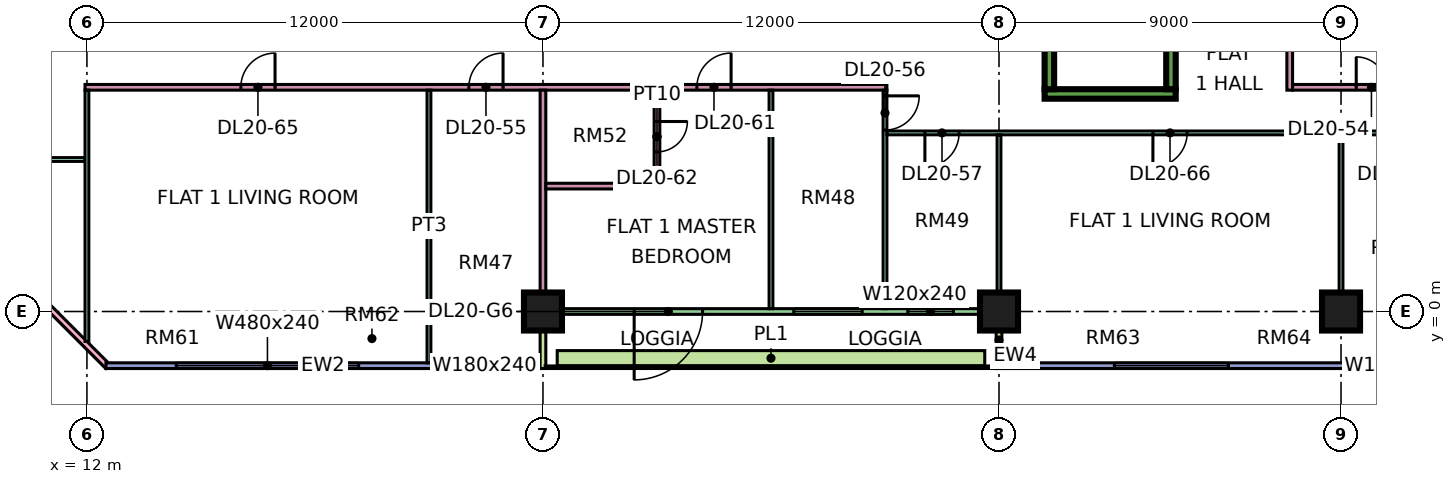
"""IFC4 building model, lengths in metres.
Left out: names, types, materials, properties, quantities, classifications, styles, units other than length and angle.
Written with IfcOpenShell. Run it as: python <this file> out.ifc"""

import sys

from ifc_helpers import new_model, si_unit, direction, frame, frame_2d, origin, origin_2d, place, context, subcontext, project, spatial, rectangle, extrude, element, fill, save


model = new_model("IFC4")
c1 = context("Model", 3, precision=1e-05, world=origin(), true_north=direction((0.0, 1.0)))
c2 = subcontext(c1, "Body", "Model", "MODEL_VIEW")
j1 = project(units=[si_unit("LENGTHUNIT", "METRE"), si_unit("PLANEANGLEUNIT", "RADIAN")], contexts=[c1])
p1 = place(None, origin())
s1 = spatial("IfcSite", under=j1, at=p1, CompositionType="ELEMENT")
p2 = place(p1, origin())
s2 = spatial("IfcBuilding", under=s1, at=p2, CompositionType="ELEMENT")
p3 = place(p2, frame((0.0, 0.0, 91.9)))
s3 = spatial("IfcBuildingStorey", under=s2, at=p3, CompositionType="ELEMENT", Elevation=91.9)
for number, where, z_axis, x_axis in (
    (1, (24.0, 0.0, 0.0), (0.0, 0.0, 1.0), (1.0, 0.0, 0.0)),
    (2, (36.0, 0.0, 0.0), (0.0, 0.0, 1.0), (1.0, 0.0, 0.0)),
    (3, (45.0, 0.0, 0.0), (0.0, 0.0, 1.0), (1.0, 0.0, 0.0)),
):
    element("IfcColumn", number, at=place(p3, frame(where, z_axis=z_axis, x_axis=x_axis)), inside=s3, PredefinedType="COLUMN", context=c2, shape_type="SweptSolid", body=[
        extrude(rectangle(XDim=1.0, YDim=1.0, at=origin_2d()), origin(), (0.0, 0.0, 1.0), 3.75),
    ])
p4 = place(p3, frame((37.2, 5.725, 0.0), z_axis=(0.0, 0.0, 1.0), x_axis=(1.0, 0.0, 0.0)))
e4 = element("IfcWall", 4, at=p4, inside=s3, PredefinedType="SHEAR", context=c2, shape_type="SweptSolid", body=[
    extrude(rectangle(XDim=3.45, YDim=0.25, at=frame_2d((1.725, 0.0))), origin(), (0.0, 0.0, 1.0), 3.75),
])
for number, where, z_axis, x_axis in (
    (5, (37.325, 5.85, 0.0), (0.0, 0.0, 1.0), (0.0, 1.0, 0.0)),
    (6, (40.525, 5.85, 0.0), (0.0, 0.0, 1.0), (0.0, 1.0, 0.0)),
):
    element("IfcWall", number, at=place(p3, frame(where, z_axis=z_axis, x_axis=x_axis)), inside=s3, PredefinedType="SHEAR", context=c2, shape_type="SweptSolid", body=[
        extrude(rectangle(XDim=6.5, YDim=0.25, at=frame_2d((3.25, 0.0))), origin(), (0.0, 0.0, 1.0), 3.75),
    ])
p5 = place(p3, frame((-1.447, 12.553, 0.0), z_axis=(0.0, 0.0, 1.0), x_axis=(0.707106781187, -0.707106781187, 0.0)))
e7 = element("IfcWall", 7, at=p5, inside=s3, PredefinedType="SOLIDWALL", context=c2, shape_type="SweptSolid", body=[
    extrude(rectangle(XDim=19.799, YDim=0.15, at=frame_2d((9.899, 0.0))), origin(), (0.0, 0.0, 1.0), 3.35),
])
p6 = place(p5, frame((2.212, 0.0, 0.45)))
e8 = element("IfcOpeningElement", 8, at=p6, cuts=e7, PredefinedType="OPENING", context=c2, shape_type="SweptSolid", body=[
    extrude(rectangle(XDim=3.0, YDim=2.4, at=frame_2d((1.5, 1.2))), frame((0.0, 0.085, 0.0), z_axis=(0.0, -1.0, 0.0), x_axis=(1.0, 0.0, 0.0)), (0.0, 0.0, 1.0), 0.17),
])
p7 = place(p5, frame((10.216, 0.0, 0.45)))
e9 = element("IfcOpeningElement", 9, at=p7, cuts=e7, PredefinedType="OPENING", context=c2, shape_type="SweptSolid", body=[
    extrude(rectangle(XDim=3.0, YDim=2.4, at=frame_2d((1.5, 1.2))), frame((0.0, 0.085, 0.0), z_axis=(0.0, -1.0, 0.0), x_axis=(1.0, 0.0, 0.0)), (0.0, 0.0, 1.0), 0.17),
])
p8 = place(p3, frame((12.5, -1.425, 0.0), z_axis=(0.0, 0.0, 1.0), x_axis=(1.0, 0.0, 0.0)))
e10 = element("IfcWall", 10, at=p8, inside=s3, PredefinedType="SOLIDWALL", context=c2, shape_type="SweptSolid", body=[
    extrude(rectangle(XDim=11.425, YDim=0.15, at=frame_2d((5.712, 0.0))), origin(), (0.0, 0.0, 1.0), 3.35),
])
p9 = place(p8, frame((1.85, 0.0, 0.45)))
e11 = element("IfcOpeningElement", 11, at=p9, cuts=e10, PredefinedType="OPENING", context=c2, shape_type="SweptSolid", body=[
    extrude(rectangle(XDim=4.8, YDim=2.4, at=frame_2d((2.4, 1.2))), frame((0.0, 0.085, 0.0), z_axis=(0.0, -1.0, 0.0), x_axis=(1.0, 0.0, 0.0)), (0.0, 0.0, 1.0), 0.17),
])
p10 = place(p8, frame((9.062, 0.0, 0.45)))
e12 = element("IfcOpeningElement", 12, at=p10, cuts=e10, PredefinedType="OPENING", context=c2, shape_type="SweptSolid", body=[
    extrude(rectangle(XDim=1.8, YDim=2.4, at=frame_2d((0.9, 1.2))), frame((0.0, 0.085, 0.0), z_axis=(0.0, -1.0, 0.0), x_axis=(1.0, 0.0, 0.0)), (0.0, 0.0, 1.0), 0.17),
])
p11 = place(p3, frame((24.075, 0.0, 0.0), z_axis=(0.0, 0.0, 1.0), x_axis=(1.0, 0.0, 0.0)))
e13 = element("IfcWall", 13, at=p11, inside=s3, PredefinedType="SOLIDWALL", context=c2, shape_type="SweptSolid", body=[
    extrude(rectangle(XDim=11.85, YDim=0.15, at=frame_2d((5.925, 0.0))), origin(), (0.0, 0.0, 1.0), 3.35),
])
p12 = place(p11, frame((2.325, 0.0, 0.0)))
e14 = element("IfcOpeningElement", 14, at=p12, cuts=e13, PredefinedType="OPENING", context=c2, shape_type="SweptSolid", body=[
    extrude(rectangle(XDim=1.8, YDim=2.4, at=frame_2d((0.9, 1.2))), frame((0.0, 0.085, 0.0), z_axis=(0.0, -1.0, 0.0), x_axis=(1.0, 0.0, 0.0)), (0.0, 0.0, 1.0), 0.17),
])
p13 = place(p11, frame((6.525, 0.0, 0.45)))
e15 = element("IfcOpeningElement", 15, at=p13, cuts=e13, PredefinedType="OPENING", context=c2, shape_type="SweptSolid", body=[
    extrude(rectangle(XDim=1.8, YDim=2.4, at=frame_2d((0.9, 1.2))), frame((0.0, 0.085, 0.0), z_axis=(0.0, -1.0, 0.0), x_axis=(1.0, 0.0, 0.0)), (0.0, 0.0, 1.0), 0.17),
])
p14 = place(p11, frame((9.525, 0.0, 0.45)))
e16 = element("IfcOpeningElement", 16, at=p14, cuts=e13, PredefinedType="OPENING", context=c2, shape_type="SweptSolid", body=[
    extrude(rectangle(XDim=1.2, YDim=2.4, at=frame_2d((0.6, 1.2))), frame((0.0, 0.085, 0.0), z_axis=(0.0, -1.0, 0.0), x_axis=(1.0, 0.0, 0.0)), (0.0, 0.0, 1.0), 0.17),
])
for number, where, z_axis, x_axis in (
    (17, (24.0, -1.5, 0.0), (0.0, 0.0, 1.0), (0.0, 1.0, 0.0)),
    (18, (36.0, -1.5, 0.0), (0.0, 0.0, 1.0), (0.0, 1.0, 0.0)),
):
    element("IfcWall", number, at=place(p3, frame(where, z_axis=z_axis, x_axis=x_axis)), inside=s3, PredefinedType="SOLIDWALL", context=c2, shape_type="SweptSolid", body=[
        extrude(rectangle(XDim=1.5, YDim=0.15, at=frame_2d((0.75, 0.0))), origin(), (0.0, 0.0, 1.0), 3.35),
    ])
p15 = place(p3, frame((36.075, -1.425, 0.0), z_axis=(0.0, 0.0, 1.0), x_axis=(1.0, 0.0, 0.0)))
e19 = element("IfcWall", 19, at=p15, inside=s3, PredefinedType="SOLIDWALL", context=c2, shape_type="SweptSolid", body=[
    extrude(rectangle(XDim=11.85, YDim=0.15, at=frame_2d((5.925, 0.0))), origin(), (0.0, 0.0, 1.0), 3.35),
])
p16 = place(p15, frame((2.962, 0.0, 0.45)))
e20 = element("IfcOpeningElement", 20, at=p16, cuts=e19, PredefinedType="OPENING", context=c2, shape_type="SweptSolid", body=[
    extrude(rectangle(XDim=3.0, YDim=2.4, at=frame_2d((1.5, 1.2))), frame((0.0, 0.085, 0.0), z_axis=(0.0, -1.0, 0.0), x_axis=(1.0, 0.0, 0.0)), (0.0, 0.0, 1.0), 0.17),
])
p17 = place(p15, frame((9.488, 0.0, 0.45)))
e21 = element("IfcOpeningElement", 21, at=p17, cuts=e19, PredefinedType="OPENING", context=c2, shape_type="SweptSolid", body=[
    extrude(rectangle(XDim=1.8, YDim=2.4, at=frame_2d((0.9, 1.2))), frame((0.0, 0.085, 0.0), z_axis=(0.0, -1.0, 0.0), x_axis=(1.0, 0.0, 0.0)), (0.0, 0.0, 1.0), 0.17),
])
p18 = place(p3, frame((24.375, -1.229, 0.0), z_axis=(0.0, 0.0, 1.0), x_axis=(1.0, 0.0, 0.0)))
e22 = element("IfcWall", 22, at=p18, inside=s3, PredefinedType="SOLIDWALL", context=c2, shape_type="SweptSolid", body=[
    extrude(rectangle(XDim=11.25, YDim=0.4, at=frame_2d((5.625, 0.0))), origin(), (0.0, 0.0, 1.0), 0.7),
])
p19 = place(p3, frame((9.05, 4.0, 0.0), z_axis=(0.0, 0.0, 1.0), x_axis=(1.0, 0.0, 0.0)))
e23 = element("IfcWall", 23, at=p19, inside=s3, PredefinedType="PARTITIONING", context=c2, shape_type="SweptSolid", body=[
    extrude(rectangle(XDim=2.9, YDim=0.1, at=frame_2d((1.45, 0.0))), origin(), (0.0, 0.0, 1.0), 3.35),
])
p20 = place(p3, frame((11.95, 5.9, 0.0), z_axis=(0.0, 0.0, 1.0), x_axis=(1.0, 0.0, 0.0)))
e24 = element("IfcWall", 24, at=p20, inside=s3, PredefinedType="PARTITIONING", context=c2, shape_type="SweptSolid", body=[
    extrude(rectangle(XDim=21.1, YDim=0.15, at=frame_2d((10.55, 0.0))), origin(), (0.0, 0.0, 1.0), 3.35),
])
p21 = place(p20, frame((10.1, 0.0, 0.0)))
e25 = element("IfcOpeningElement", 25, at=p21, cuts=e24, PredefinedType="OPENING", context=c2, shape_type="SweptSolid", body=[
    extrude(rectangle(XDim=0.9, YDim=2.1, at=frame_2d((0.45, 1.05))), frame((0.0, 0.085, 0.0), z_axis=(0.0, -1.0, 0.0), x_axis=(1.0, 0.0, 0.0)), (0.0, 0.0, 1.0), 0.17),
])
p22 = place(p20, frame((16.1, 0.0, 0.0)))
e26 = element("IfcOpeningElement", 26, at=p22, cuts=e24, PredefinedType="OPENING", context=c2, shape_type="SweptSolid", body=[
    extrude(rectangle(XDim=0.9, YDim=2.1, at=frame_2d((0.45, 1.05))), frame((0.0, 0.085, 0.0), z_axis=(0.0, -1.0, 0.0), x_axis=(1.0, 0.0, 0.0)), (0.0, 0.0, 1.0), 0.17),
])
p23 = place(p20, frame((4.1, 0.0, 0.0)))
e27 = element("IfcOpeningElement", 27, at=p23, cuts=e24, PredefinedType="OPENING", context=c2, shape_type="SweptSolid", body=[
    extrude(rectangle(XDim=0.9, YDim=2.1, at=frame_2d((0.45, 1.05))), frame((0.0, 0.085, 0.0), z_axis=(0.0, -1.0, 0.0), x_axis=(1.0, 0.0, 0.0)), (0.0, 0.0, 1.0), 0.17),
])
p24 = place(p3, frame((12.0, -0.788, 0.0), z_axis=(0.0, 0.0, 1.0), x_axis=(0.0, 1.0, 0.0)))
e28 = element("IfcWall", 28, at=p24, inside=s3, PredefinedType="PARTITIONING", context=c2, shape_type="SweptSolid", body=[
    extrude(rectangle(XDim=6.613, YDim=0.1, at=frame_2d((3.306, 0.0))), origin(), (0.0, 0.0, 1.0), 3.35),
])
p25 = place(p3, frame((21.0, -1.35, 0.0), z_axis=(0.0, 0.0, 1.0), x_axis=(0.0, 1.0, 0.0)))
e29 = element("IfcWall", 29, at=p25, inside=s3, PredefinedType="PARTITIONING", context=c2, shape_type="SweptSolid", body=[
    extrude(rectangle(XDim=7.175, YDim=0.1, at=frame_2d((3.587, 0.0))), origin(), (0.0, 0.0, 1.0), 3.35),
])
p26 = place(p3, frame((24.0, 0.0, 0.0), z_axis=(0.0, 0.0, 1.0), x_axis=(0.0, 1.0, 0.0)))
e30 = element("IfcWall", 30, at=p26, inside=s3, PredefinedType="PARTITIONING", context=c2, shape_type="SweptSolid", body=[
    extrude(rectangle(XDim=5.825, YDim=0.15, at=frame_2d((2.913, 0.0))), origin(), (0.0, 0.0, 1.0), 3.35),
])
p27 = place(p3, frame((24.075, 3.3, 0.0), z_axis=(0.0, 0.0, 1.0), x_axis=(1.0, 0.0, 0.0)))
e31 = element("IfcWall", 31, at=p27, inside=s3, PredefinedType="PARTITIONING", context=c2, shape_type="SweptSolid", body=[
    extrude(rectangle(XDim=3.0, YDim=0.15, at=frame_2d((1.5, 0.0))), origin(), (0.0, 0.0, 1.0), 3.35),
])
p28 = place(p3, frame((27.0, 3.375, 0.0), z_axis=(0.0, 0.0, 1.0), x_axis=(0.0, 1.0, 0.0)))
e32 = element("IfcWall", 32, at=p28, inside=s3, PredefinedType="PARTITIONING", context=c2, shape_type="SweptSolid", body=[
    extrude(rectangle(XDim=2.45, YDim=0.15, at=frame_2d((1.225, 0.0))), origin(), (0.0, 0.0, 1.0), 3.35),
])
p29 = place(p28, frame((0.825, 0.0, 0.0)))
e33 = element("IfcOpeningElement", 33, at=p29, cuts=e32, PredefinedType="OPENING", context=c2, shape_type="SweptSolid", body=[
    extrude(rectangle(XDim=0.8, YDim=2.1, at=frame_2d((0.4, 1.05))), frame((0.0, 0.085, 0.0), z_axis=(0.0, -1.0, 0.0), x_axis=(1.0, 0.0, 0.0)), (0.0, 0.0, 1.0), 0.17),
])
p30 = place(p3, frame((30.0, 0.074, 0.0), z_axis=(0.0, 0.0, 1.0), x_axis=(0.0, 1.0, 0.0)))
e34 = element("IfcWall", 34, at=p30, inside=s3, PredefinedType="PARTITIONING", context=c2, shape_type="SweptSolid", body=[
    extrude(rectangle(XDim=5.751, YDim=0.1, at=frame_2d((2.875, 0.0))), origin(), (0.0, 0.0, 1.0), 3.35),
])
p31 = place(p3, frame((33.0, 0.074, 0.0), z_axis=(0.0, 0.0, 1.0), x_axis=(0.0, 1.0, 0.0)))
e35 = element("IfcWall", 35, at=p31, inside=s3, PredefinedType="PARTITIONING", context=c2, shape_type="SweptSolid", body=[
    extrude(rectangle(XDim=5.751, YDim=0.1, at=frame_2d((2.875, 0.0))), origin(), (0.0, 0.0, 1.0), 3.35),
])
p32 = place(p31, frame((4.701, 0.0, 0.0)))
e36 = element("IfcOpeningElement", 36, at=p32, cuts=e35, PredefinedType="OPENING", context=c2, shape_type="SweptSolid", body=[
    extrude(rectangle(XDim=0.9, YDim=2.1, at=frame_2d((0.45, 1.05))), frame((0.0, 0.06, 0.0), z_axis=(0.0, -1.0, 0.0), x_axis=(1.0, 0.0, 0.0)), (0.0, 0.0, 1.0), 0.12),
])
p33 = place(p3, frame((33.05, 4.7, 0.0), z_axis=(0.0, 0.0, 1.0), x_axis=(1.0, 0.0, 0.0)))
e37 = element("IfcWall", 37, at=p33, inside=s3, PredefinedType="PARTITIONING", context=c2, shape_type="SweptSolid", body=[
    extrude(rectangle(XDim=14.85, YDim=0.1, at=frame_2d((7.425, 0.0))), origin(), (0.0, 0.0, 1.0), 3.35),
])
p34 = place(p33, frame((1.0, 0.0, 0.0)))
e38 = element("IfcOpeningElement", 38, at=p34, cuts=e37, PredefinedType="OPENING", context=c2, shape_type="SweptSolid", body=[
    extrude(rectangle(XDim=0.9, YDim=2.1, at=frame_2d((0.45, 1.05))), frame((0.0, 0.06, 0.0), z_axis=(0.0, -1.0, 0.0), x_axis=(1.0, 0.0, 0.0)), (0.0, 0.0, 1.0), 0.12),
])
p35 = place(p33, frame((13.0, 0.0, 0.0)))
e39 = element("IfcOpeningElement", 39, at=p35, cuts=e37, PredefinedType="OPENING", context=c2, shape_type="SweptSolid", body=[
    extrude(rectangle(XDim=0.9, YDim=2.1, at=frame_2d((0.45, 1.05))), frame((0.0, 0.06, 0.0), z_axis=(0.0, -1.0, 0.0), x_axis=(1.0, 0.0, 0.0)), (0.0, 0.0, 1.0), 0.12),
])
p36 = place(p33, frame((7.0, 0.0, 0.0)))
e40 = element("IfcOpeningElement", 40, at=p36, cuts=e37, PredefinedType="OPENING", context=c2, shape_type="SweptSolid", body=[
    extrude(rectangle(XDim=0.9, YDim=2.1, at=frame_2d((0.45, 1.05))), frame((0.0, 0.06, 0.0), z_axis=(0.0, -1.0, 0.0), x_axis=(1.0, 0.0, 0.0)), (0.0, 0.0, 1.0), 0.12),
])
p37 = place(p3, frame((36.0, 0.0, 0.0), z_axis=(0.0, 0.0, 1.0), x_axis=(0.0, 1.0, 0.0)))
e41 = element("IfcWall", 41, at=p37, inside=s3, PredefinedType="PARTITIONING", context=c2, shape_type="SweptSolid", body=[
    extrude(rectangle(XDim=4.65, YDim=0.1, at=frame_2d((2.325, 0.0))), origin(), (0.0, 0.0, 1.0), 3.35),
])
p38 = place(p3, frame((43.65, 5.825, 0.0), z_axis=(0.0, 0.0, 1.0), x_axis=(0.0, 1.0, 0.0)))
e42 = element("IfcWall", 42, at=p38, inside=s3, PredefinedType="PARTITIONING", context=c2, shape_type="SweptSolid", body=[
    extrude(rectangle(XDim=6.575, YDim=0.15, at=frame_2d((3.288, 0.0))), origin(), (0.0, 0.0, 1.0), 3.35),
])
p39 = place(p38, frame((4.425, 0.0, 0.0)))
e43 = element("IfcOpeningElement", 43, at=p39, cuts=e42, PredefinedType="OPENING", context=c2, shape_type="SweptSolid", body=[
    extrude(rectangle(XDim=0.9, YDim=2.1, at=frame_2d((0.45, 1.05))), frame((0.0, 0.085, 0.0), z_axis=(0.0, -1.0, 0.0), x_axis=(1.0, 0.0, 0.0)), (0.0, 0.0, 1.0), 0.17),
])
p40 = place(p3, frame((43.725, 5.9, 0.0), z_axis=(0.0, 0.0, 1.0), x_axis=(1.0, 0.0, 0.0)))
e44 = element("IfcWall", 44, at=p40, inside=s3, PredefinedType="PARTITIONING", context=c2, shape_type="SweptSolid", body=[
    extrude(rectangle(XDim=4.175, YDim=0.15, at=frame_2d((2.087, 0.0))), origin(), (0.0, 0.0, 1.0), 3.35),
])
p41 = place(p40, frame((1.675, 0.0, 0.0)))
e45 = element("IfcOpeningElement", 45, at=p41, cuts=e44, PredefinedType="OPENING", context=c2, shape_type="SweptSolid", body=[
    extrude(rectangle(XDim=0.8, YDim=2.1, at=frame_2d((0.4, 1.05))), frame((0.0, 0.085, 0.0), z_axis=(0.0, -1.0, 0.0), x_axis=(1.0, 0.0, 0.0)), (0.0, 0.0, 1.0), 0.17),
])
p42 = place(p3, frame((45.0, 0.0, 0.0), z_axis=(0.0, 0.0, 1.0), x_axis=(0.0, 1.0, 0.0)))
e46 = element("IfcWall", 46, at=p42, inside=s3, PredefinedType="PARTITIONING", context=c2, shape_type="SweptSolid", body=[
    extrude(rectangle(XDim=4.65, YDim=0.1, at=frame_2d((2.325, 0.0))), origin(), (0.0, 0.0, 1.0), 3.35),
])
p43 = place(p9, origin())
e47 = element("IfcWindow", 47, at=p43, inside=s3, PartitioningType="SINGLE_PANEL", PredefinedType="WINDOW", context=c2, shape_type="SweptSolid", body=[
    extrude(rectangle(XDim=4.8, YDim=2.4, at=frame_2d((2.4, 1.2))), frame((0.0, 0.03, 0.0), z_axis=(0.0, -1.0, 0.0), x_axis=(1.0, 0.0, 0.0)), (0.0, 0.0, 1.0), 0.06),
])
fill(e11, e47)
p44 = place(p10, origin())
e48 = element("IfcWindow", 48, at=p44, inside=s3, PartitioningType="SINGLE_PANEL", PredefinedType="WINDOW", context=c2, shape_type="SweptSolid", body=[
    extrude(rectangle(XDim=1.8, YDim=2.4, at=frame_2d((0.9, 1.2))), frame((0.0, 0.03, 0.0), z_axis=(0.0, -1.0, 0.0), x_axis=(1.0, 0.0, 0.0)), (0.0, 0.0, 1.0), 0.06),
])
fill(e12, e48)
p45 = place(p12, frame((1.8, 0.0, 0.0), z_axis=(0.0, 0.0, 1.0), x_axis=(-1.0, 0.0, 0.0)))
e49 = element("IfcDoor", 49, at=p45, inside=s3, OperationType="DOUBLE_DOOR_SINGLE_SWING", PredefinedType="DOOR", context=c2, shape_type="SweptSolid", body=[
    extrude(rectangle(XDim=1.8, YDim=2.4, at=frame_2d((0.9, 1.2))), frame((0.0, 0.025, 0.0), z_axis=(0.0, -1.0, 0.0), x_axis=(1.0, 0.0, 0.0)), (0.0, 0.0, 1.0), 0.05),
])
fill(e14, e49)
p46 = place(p13, origin())
e50 = element("IfcWindow", 50, at=p46, inside=s3, PartitioningType="SINGLE_PANEL", PredefinedType="WINDOW", context=c2, shape_type="SweptSolid", body=[
    extrude(rectangle(XDim=1.8, YDim=2.4, at=frame_2d((0.9, 1.2))), frame((0.0, 0.03, 0.0), z_axis=(0.0, -1.0, 0.0), x_axis=(1.0, 0.0, 0.0)), (0.0, 0.0, 1.0), 0.06),
])
fill(e15, e50)
p47 = place(p14, origin())
e51 = element("IfcWindow", 51, at=p47, inside=s3, PartitioningType="SINGLE_PANEL", PredefinedType="WINDOW", context=c2, shape_type="SweptSolid", body=[
    extrude(rectangle(XDim=1.2, YDim=2.4, at=frame_2d((0.6, 1.2))), frame((0.0, 0.03, 0.0), z_axis=(0.0, -1.0, 0.0), x_axis=(1.0, 0.0, 0.0)), (0.0, 0.0, 1.0), 0.06),
])
fill(e16, e51)
p48 = place(p16, origin())
e52 = element("IfcWindow", 52, at=p48, inside=s3, PartitioningType="SINGLE_PANEL", PredefinedType="WINDOW", context=c2, shape_type="SweptSolid", body=[
    extrude(rectangle(XDim=3.0, YDim=2.4, at=frame_2d((1.5, 1.2))), frame((0.0, 0.03, 0.0), z_axis=(0.0, -1.0, 0.0), x_axis=(1.0, 0.0, 0.0)), (0.0, 0.0, 1.0), 0.06),
])
fill(e20, e52)
p49 = place(p17, origin())
e53 = element("IfcWindow", 53, at=p49, inside=s3, PartitioningType="SINGLE_PANEL", PredefinedType="WINDOW", context=c2, shape_type="SweptSolid", body=[
    extrude(rectangle(XDim=1.8, YDim=2.4, at=frame_2d((0.9, 1.2))), frame((0.0, 0.03, 0.0), z_axis=(0.0, -1.0, 0.0), x_axis=(1.0, 0.0, 0.0)), (0.0, 0.0, 1.0), 0.06),
])
fill(e21, e53)
p50 = place(p41, origin())
e54 = element("IfcDoor", 54, at=p50, inside=s3, OperationType="SINGLE_SWING_LEFT", PredefinedType="DOOR", context=c2, shape_type="SweptSolid", body=[
    extrude(rectangle(XDim=0.8, YDim=2.1, at=frame_2d((0.4, 1.05))), frame((0.0, 0.025, 0.0), z_axis=(0.0, -1.0, 0.0), x_axis=(1.0, 0.0, 0.0)), (0.0, 0.0, 1.0), 0.05),
])
fill(e45, e54)
p51 = place(p21, frame((0.9, 0.0, 0.0), z_axis=(0.0, 0.0, 1.0), x_axis=(-1.0, 0.0, 0.0)))
e55 = element("IfcDoor", 55, at=p51, inside=s3, OperationType="SINGLE_SWING_RIGHT", PredefinedType="DOOR", context=c2, shape_type="SweptSolid", body=[
    extrude(rectangle(XDim=0.9, YDim=2.1, at=frame_2d((0.45, 1.05))), frame((0.0, 0.025, 0.0), z_axis=(0.0, -1.0, 0.0), x_axis=(1.0, 0.0, 0.0)), (0.0, 0.0, 1.0), 0.05),
])
fill(e25, e55)
p52 = place(p32, origin())
e56 = element("IfcDoor", 56, at=p52, inside=s3, OperationType="SINGLE_SWING_RIGHT", PredefinedType="DOOR", context=c2, shape_type="SweptSolid", body=[
    extrude(rectangle(XDim=0.9, YDim=2.1, at=frame_2d((0.45, 1.05))), frame((0.0, 0.025, 0.0), z_axis=(0.0, -1.0, 0.0), x_axis=(1.0, 0.0, 0.0)), (0.0, 0.0, 1.0), 0.05),
])
fill(e36, e56)
p53 = place(p34, frame((0.9, 0.0, 0.0), z_axis=(0.0, 0.0, 1.0), x_axis=(-1.0, 0.0, 0.0)))
e57 = element("IfcDoor", 57, at=p53, inside=s3, OperationType="SINGLE_SWING_LEFT", PredefinedType="DOOR", context=c2, shape_type="SweptSolid", body=[
    extrude(rectangle(XDim=0.9, YDim=2.1, at=frame_2d((0.45, 1.05))), frame((0.0, 0.025, 0.0), z_axis=(0.0, -1.0, 0.0), x_axis=(1.0, 0.0, 0.0)), (0.0, 0.0, 1.0), 0.05),
])
fill(e38, e57)
p54 = place(p22, frame((0.9, 0.0, 0.0), z_axis=(0.0, 0.0, 1.0), x_axis=(-1.0, 0.0, 0.0)))
e58 = element("IfcDoor", 58, at=p54, inside=s3, OperationType="SINGLE_SWING_RIGHT", PredefinedType="DOOR", context=c2, shape_type="SweptSolid", body=[
    extrude(rectangle(XDim=0.9, YDim=2.1, at=frame_2d((0.45, 1.05))), frame((0.0, 0.025, 0.0), z_axis=(0.0, -1.0, 0.0), x_axis=(1.0, 0.0, 0.0)), (0.0, 0.0, 1.0), 0.05),
])
fill(e26, e58)
p55 = place(p29, origin())
e59 = element("IfcDoor", 59, at=p55, inside=s3, OperationType="SINGLE_SWING_RIGHT", PredefinedType="DOOR", context=c2, shape_type="SweptSolid", body=[
    extrude(rectangle(XDim=0.8, YDim=2.1, at=frame_2d((0.4, 1.05))), frame((0.0, 0.025, 0.0), z_axis=(0.0, -1.0, 0.0), x_axis=(1.0, 0.0, 0.0)), (0.0, 0.0, 1.0), 0.05),
])
fill(e33, e59)
p56 = place(p23, frame((0.9, 0.0, 0.0), z_axis=(0.0, 0.0, 1.0), x_axis=(-1.0, 0.0, 0.0)))
e60 = element("IfcDoor", 60, at=p56, inside=s3, OperationType="SINGLE_SWING_RIGHT", PredefinedType="DOOR", context=c2, shape_type="SweptSolid", body=[
    extrude(rectangle(XDim=0.9, YDim=2.1, at=frame_2d((0.45, 1.05))), frame((0.0, 0.025, 0.0), z_axis=(0.0, -1.0, 0.0), x_axis=(1.0, 0.0, 0.0)), (0.0, 0.0, 1.0), 0.05),
])
fill(e27, e60)
p57 = place(p36, frame((0.9, 0.0, 0.0), z_axis=(0.0, 0.0, 1.0), x_axis=(-1.0, 0.0, 0.0)))
e61 = element("IfcDoor", 61, at=p57, inside=s3, OperationType="SINGLE_SWING_LEFT", PredefinedType="DOOR", context=c2, shape_type="SweptSolid", body=[
    extrude(rectangle(XDim=0.9, YDim=2.1, at=frame_2d((0.45, 1.05))), frame((0.0, 0.025, 0.0), z_axis=(0.0, -1.0, 0.0), x_axis=(1.0, 0.0, 0.0)), (0.0, 0.0, 1.0), 0.05),
])
fill(e40, e61)
save(model, sys.argv[1])
